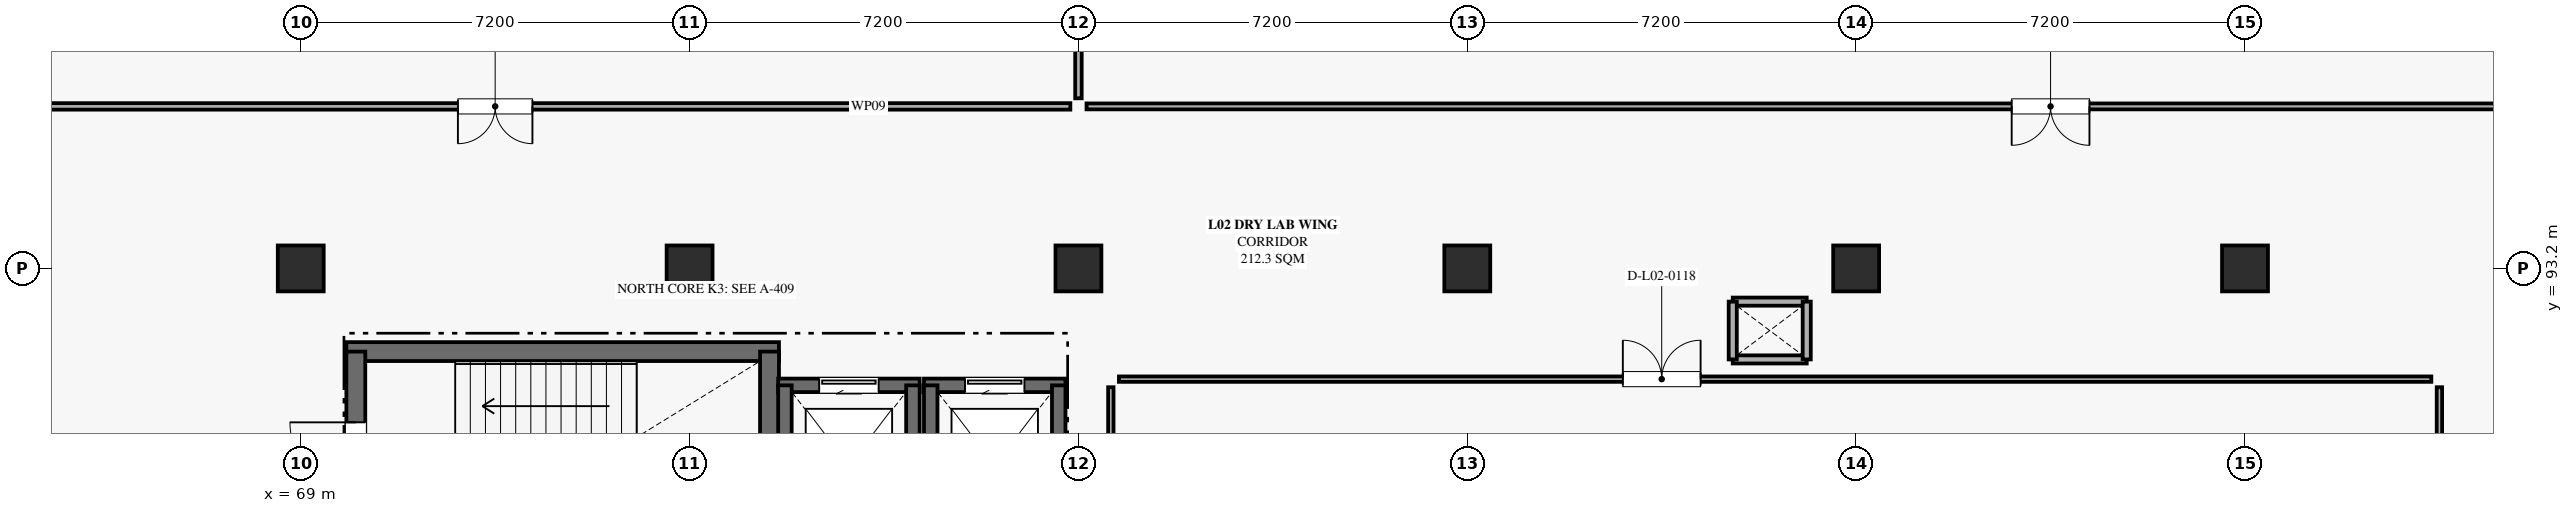
"""IFC4 building model, lengths in metres.
Left out: names, types, materials, properties, quantities, classifications, styles, units other than length and angle.
Written with IfcOpenShell. Run it as: python <this file> out.ifc"""

import sys

from ifc_helpers import new_model, si_unit, direction, frame, frame_2d, origin, origin_2d, place, context, subcontext, project, spatial, rectangle, extrude, element, fill, save


model = new_model("IFC4")
c1 = context("Model", 3, precision=1e-05, world=origin(), true_north=direction((0.0, 1.0)))
c2 = subcontext(c1, "Body", "Model", "MODEL_VIEW")
j1 = project(units=[si_unit("LENGTHUNIT", "METRE"), si_unit("PLANEANGLEUNIT", "RADIAN")], contexts=[c1])
p1 = place(None, origin())
s1 = spatial("IfcSite", under=j1, at=p1, CompositionType="ELEMENT")
p2 = place(p1, origin())
s2 = spatial("IfcBuilding", under=s1, at=p2, CompositionType="ELEMENT")
p3 = place(p2, frame((0.0, 0.0, 10.44)))
s3 = spatial("IfcBuildingStorey", under=s2, at=p3, CompositionType="ELEMENT", Elevation=10.44)
for number, where, z_axis, x_axis in (
    (1, (69.0, 93.2, 0.0), (0.0, 0.0, 1.0), (1.0, 0.0, 0.0)),
    (2, (76.2, 93.2, 0.0), (0.0, 0.0, 1.0), (1.0, 0.0, 0.0)),
    (3, (83.4, 93.2, 0.0), (0.0, 0.0, 1.0), (1.0, 0.0, 0.0)),
    (4, (90.6, 93.2, 0.0), (0.0, 0.0, 1.0), (1.0, 0.0, 0.0)),
    (5, (97.8, 93.2, 0.0), (0.0, 0.0, 1.0), (1.0, 0.0, 0.0)),
    (6, (105.0, 93.2, 0.0), (0.0, 0.0, 1.0), (1.0, 0.0, 0.0)),
):
    element("IfcColumn", number, at=place(p3, frame(where, z_axis=z_axis, x_axis=x_axis)), inside=s3, PredefinedType="COLUMN", context=c2, shape_type="SweptSolid", body=[
        extrude(rectangle(XDim=0.85, YDim=0.85, at=origin_2d()), origin(), (0.0, 0.0, 1.0), 4.68),
    ])
p4 = place(p3, frame((69.845, 91.66, 0.0), z_axis=(0.0, 0.0, 1.0), x_axis=(1.0, 0.0, 0.0)))
e7 = element("IfcWall", 7, at=p4, inside=s3, PredefinedType="SHEAR", context=c2, shape_type="SweptSolid", body=[
    extrude(rectangle(XDim=8.01, YDim=0.35, at=frame_2d((4.005, 0.0))), origin(), (0.0, 0.0, 1.0), 4.41),
])
p5 = place(p3, frame((70.02, 87.82, 0.0), z_axis=(0.0, 0.0, 1.0), x_axis=(0.0, 1.0, 0.0)))
e8 = element("IfcWall", 8, at=p5, inside=s3, PredefinedType="SHEAR", context=c2, shape_type="SweptSolid", body=[
    extrude(rectangle(XDim=3.84, YDim=0.35, at=frame_2d((1.92, 0.0))), origin(), (0.0, 0.0, 1.0), 4.41),
])
p6 = place(p5, frame((1.31, 0.0, 0.0)))
e9 = element("IfcOpeningElement", 9, at=p6, cuts=e8, PredefinedType="OPENING", context=c2, shape_type="SweptSolid", body=[
    extrude(rectangle(XDim=1.22, YDim=2.18, at=frame_2d((0.61, 1.09))), frame((0.0, 0.185, 0.0), z_axis=(0.0, -1.0, 0.0), x_axis=(1.0, 0.0, 0.0)), (0.0, 0.0, 1.0), 0.37),
])
p7 = place(p3, frame((77.68, 91.66, 0.0), z_axis=(0.0, 0.0, 1.0), x_axis=(0.0, -1.0, 0.0)))
e10 = element("IfcWall", 10, at=p7, inside=s3, PredefinedType="SHEAR", context=c2, shape_type="SweptSolid", body=[
    extrude(rectangle(XDim=3.84, YDim=0.35, at=frame_2d((1.92, 0.0))), origin(), (0.0, 0.0, 1.0), 4.41),
])
for number, where, z_axis, x_axis in (
    (11, (96.885, 91.515, 0.0), (0.0, 0.0, 1.0), (-1.0, 0.0, 0.0)),
    (12, (95.515, 92.585, 0.0), (0.0, 0.0, 1.0), (1.0, 0.0, 0.0)),
):
    element("IfcWall", number, at=place(p3, frame(where, z_axis=z_axis, x_axis=x_axis)), inside=s3, PredefinedType="PARTITIONING", context=c2, shape_type="SweptSolid", body=[
        extrude(rectangle(XDim=1.37, YDim=0.15, at=frame_2d((0.685, 0.0))), origin(), (0.0, 0.0, 1.0), 3.16),
    ])
for number, where, z_axis, x_axis in (
    (13, (95.515, 91.515, 0.0), (0.0, 0.0, 1.0), (0.0, 1.0, 0.0)),
    (14, (96.885, 92.585, 0.0), (0.0, 0.0, 1.0), (0.0, -1.0, 0.0)),
):
    element("IfcWall", number, at=place(p3, frame(where, z_axis=z_axis, x_axis=x_axis)), inside=s3, PredefinedType="PARTITIONING", context=c2, shape_type="SweptSolid", body=[
        extrude(rectangle(XDim=1.07, YDim=0.15, at=frame_2d((0.535, 0.0))), origin(), (0.0, 0.0, 1.0), 3.16),
    ])
p8 = place(p3, frame((77.84, 91.035, 0.0), z_axis=(0.0, 0.0, 1.0), x_axis=(1.0, 0.0, 0.0)))
e15 = element("IfcWall", 15, at=p8, inside=s3, PredefinedType="SHEAR", context=c2, shape_type="SweptSolid", body=[
    extrude(rectangle(XDim=2.62, YDim=0.25, at=frame_2d((1.31, 0.0))), origin(), (0.0, 0.0, 1.0), 4.41),
])
p9 = place(p8, frame((0.76, 0.0, 0.0)))
e16 = element("IfcOpeningElement", 16, at=p9, cuts=e15, PredefinedType="OPENING", context=c2, shape_type="SweptSolid", body=[
    extrude(rectangle(XDim=1.1, YDim=2.2, at=frame_2d((0.55, 1.1))), frame((0.0, 0.135, 0.0), z_axis=(0.0, -1.0, 0.0), x_axis=(1.0, 0.0, 0.0)), (0.0, 0.0, 1.0), 0.27),
])
for number, where, z_axis, x_axis in (
    (17, (77.965, 88.065, 0.0), (0.0, 0.0, 1.0), (0.0, 1.0, 0.0)),
    (18, (80.335, 91.035, 0.0), (0.0, 0.0, 1.0), (0.0, -1.0, 0.0)),
):
    element("IfcWall", number, at=place(p3, frame(where, z_axis=z_axis, x_axis=x_axis)), inside=s3, PredefinedType="SHEAR", context=c2, shape_type="SweptSolid", body=[
        extrude(rectangle(XDim=2.97, YDim=0.25, at=frame_2d((1.485, 0.0))), origin(), (0.0, 0.0, 1.0), 4.41),
    ])
p10 = place(p3, frame((80.54, 91.035, 0.0), z_axis=(0.0, 0.0, 1.0), x_axis=(1.0, 0.0, 0.0)))
e19 = element("IfcWall", 19, at=p10, inside=s3, PredefinedType="SHEAR", context=c2, shape_type="SweptSolid", body=[
    extrude(rectangle(XDim=2.62, YDim=0.25, at=frame_2d((1.31, 0.0))), origin(), (0.0, 0.0, 1.0), 4.41),
])
p11 = place(p10, frame((0.76, 0.0, 0.0)))
e20 = element("IfcOpeningElement", 20, at=p11, cuts=e19, PredefinedType="OPENING", context=c2, shape_type="SweptSolid", body=[
    extrude(rectangle(XDim=1.1, YDim=2.2, at=frame_2d((0.55, 1.1))), frame((0.0, 0.135, 0.0), z_axis=(0.0, -1.0, 0.0), x_axis=(1.0, 0.0, 0.0)), (0.0, 0.0, 1.0), 0.27),
])
for number, where, z_axis, x_axis in (
    (21, (80.665, 88.065, 0.0), (0.0, 0.0, 1.0), (0.0, 1.0, 0.0)),
    (22, (83.035, 91.035, 0.0), (0.0, 0.0, 1.0), (0.0, -1.0, 0.0)),
):
    element("IfcWall", number, at=place(p3, frame(where, z_axis=z_axis, x_axis=x_axis)), inside=s3, PredefinedType="SHEAR", context=c2, shape_type="SweptSolid", body=[
        extrude(rectangle(XDim=2.97, YDim=0.25, at=frame_2d((1.485, 0.0))), origin(), (0.0, 0.0, 1.0), 4.41),
    ])
p12 = place(p3, frame((83.25, 96.2, 0.0), z_axis=(0.0, 0.0, 1.0), x_axis=(-1.0, 0.0, 0.0)))
e23 = element("IfcWall", 23, at=p12, inside=s3, PredefinedType="PARTITIONING", context=c2, shape_type="SweptSolid", body=[
    extrude(rectangle(XDim=21.1, YDim=0.12, at=frame_2d((10.55, 0.0))), origin(), (0.0, 0.0, 1.0), 3.16),
])
p13 = place(p12, frame((9.96, 0.0, 0.0)))
e24 = element("IfcOpeningElement", 24, at=p13, cuts=e23, PredefinedType="OPENING", context=c2, shape_type="SweptSolid", body=[
    extrude(rectangle(XDim=1.38, YDim=2.22, at=frame_2d((0.69, 1.11))), frame((0.0, 0.07, 0.0), z_axis=(0.0, -1.0, 0.0), x_axis=(1.0, 0.0, 0.0)), (0.0, 0.0, 1.0), 0.14),
])
p14 = place(p3, frame((83.4, 114.2, 0.0), z_axis=(0.0, 0.0, 1.0), x_axis=(0.0, -1.0, 0.0)))
e25 = element("IfcWall", 25, at=p14, inside=s3, PredefinedType="PARTITIONING", context=c2, shape_type="SweptSolid", body=[
    extrude(rectangle(XDim=17.85, YDim=0.12, at=frame_2d((8.925, 0.0))), origin(), (0.0, 0.0, 1.0), 3.16),
])
p15 = place(p3, frame((111.85, 96.2, 0.0), z_axis=(0.0, 0.0, 1.0), x_axis=(-1.0, 0.0, 0.0)))
e26 = element("IfcWall", 26, at=p15, inside=s3, PredefinedType="PARTITIONING", context=c2, shape_type="SweptSolid", body=[
    extrude(rectangle(XDim=28.3, YDim=0.11, at=frame_2d((14.15, 0.0))), origin(), (0.0, 0.0, 1.0), 3.16),
])
p16 = place(p15, frame((9.73, 0.0, 0.0)))
e27 = element("IfcOpeningElement", 27, at=p16, cuts=e26, PredefinedType="OPENING", context=c2, shape_type="SweptSolid", body=[
    extrude(rectangle(XDim=1.44, YDim=2.05, at=frame_2d((0.72, 1.025))), frame((0.0, 0.065, 0.0), z_axis=(0.0, -1.0, 0.0), x_axis=(1.0, 0.0, 0.0)), (0.0, 0.0, 1.0), 0.13),
])
p17 = place(p3, frame((84.15, 91.15, 0.0), z_axis=(0.0, 0.0, 1.0), x_axis=(1.0, 0.0, 0.0)))
e28 = element("IfcWall", 28, at=p17, inside=s3, PredefinedType="PARTITIONING", context=c2, shape_type="SweptSolid", body=[
    extrude(rectangle(XDim=24.3, YDim=0.1, at=frame_2d((12.15, 0.0))), origin(), (0.0, 0.0, 1.0), 3.16),
])
p18 = place(p17, frame((9.33, 0.0, 0.0)))
e29 = element("IfcOpeningElement", 29, at=p18, cuts=e28, PredefinedType="OPENING", context=c2, shape_type="SweptSolid", body=[
    extrude(rectangle(XDim=1.44, YDim=2.1, at=frame_2d((0.72, 1.05))), frame((0.0, 0.06, 0.0), z_axis=(0.0, -1.0, 0.0), x_axis=(1.0, 0.0, 0.0)), (0.0, 0.0, 1.0), 0.12),
])
for number, where, z_axis, x_axis in (
    (30, (84.0, 86.35, 0.0), (0.0, 0.0, 1.0), (0.0, 1.0, 0.0)),
    (31, (108.6, 91.0, 0.0), (0.0, 0.0, 1.0), (0.0, -1.0, 0.0)),
):
    element("IfcWall", number, at=place(p3, frame(where, z_axis=z_axis, x_axis=x_axis)), inside=s3, PredefinedType="PARTITIONING", context=c2, shape_type="SweptSolid", body=[
        extrude(rectangle(XDim=4.65, YDim=0.1, at=frame_2d((2.325, 0.0))), origin(), (0.0, 0.0, 1.0), 3.16),
    ])
p19 = place(p6, origin())
e32 = element("IfcDoor", 32, at=p19, inside=s3, OperationType="SINGLE_SWING_RIGHT", PredefinedType="DOOR", context=c2, shape_type="SweptSolid", body=[
    extrude(rectangle(XDim=1.22, YDim=2.18, at=frame_2d((0.61, 1.09))), frame((0.0, 0.025, 0.0), z_axis=(0.0, -1.0, 0.0), x_axis=(1.0, 0.0, 0.0)), (0.0, 0.0, 1.0), 0.05),
])
fill(e9, e32)
p20 = place(p9, origin())
e33 = element("IfcDoor", 33, at=p20, inside=s3, OperationType="SLIDING_TO_LEFT", PredefinedType="DOOR", context=c2, shape_type="SweptSolid", body=[
    extrude(rectangle(XDim=1.1, YDim=2.2, at=frame_2d((0.55, 1.1))), frame((0.0, 0.025, 0.0), z_axis=(0.0, -1.0, 0.0), x_axis=(1.0, 0.0, 0.0)), (0.0, 0.0, 1.0), 0.05),
])
fill(e16, e33)
p21 = place(p11, origin())
e34 = element("IfcDoor", 34, at=p21, inside=s3, OperationType="SLIDING_TO_LEFT", PredefinedType="DOOR", context=c2, shape_type="SweptSolid", body=[
    extrude(rectangle(XDim=1.1, YDim=2.2, at=frame_2d((0.55, 1.1))), frame((0.0, 0.025, 0.0), z_axis=(0.0, -1.0, 0.0), x_axis=(1.0, 0.0, 0.0)), (0.0, 0.0, 1.0), 0.05),
])
fill(e20, e34)
p22 = place(p13, origin())
e35 = element("IfcDoor", 35, at=p22, inside=s3, OperationType="DOUBLE_DOOR_SINGLE_SWING", PredefinedType="DOOR", context=c2, shape_type="SweptSolid", body=[
    extrude(rectangle(XDim=1.38, YDim=2.22, at=frame_2d((0.69, 1.11))), frame((0.0, 0.025, 0.0), z_axis=(0.0, -1.0, 0.0), x_axis=(1.0, 0.0, 0.0)), (0.0, 0.0, 1.0), 0.05),
])
fill(e24, e35)
p23 = place(p16, origin())
e36 = element("IfcDoor", 36, at=p23, inside=s3, OperationType="DOUBLE_DOOR_SINGLE_SWING", PredefinedType="DOOR", context=c2, shape_type="SweptSolid", body=[
    extrude(rectangle(XDim=1.44, YDim=2.05, at=frame_2d((0.72, 1.025))), frame((0.0, 0.025, 0.0), z_axis=(0.0, -1.0, 0.0), x_axis=(1.0, 0.0, 0.0)), (0.0, 0.0, 1.0), 0.05),
])
fill(e27, e36)
p24 = place(p18, origin())
e37 = element("IfcDoor", 37, at=p24, inside=s3, OperationType="DOUBLE_DOOR_SINGLE_SWING", PredefinedType="DOOR", context=c2, shape_type="SweptSolid", body=[
    extrude(rectangle(XDim=1.44, YDim=2.1, at=frame_2d((0.72, 1.05))), frame((0.0, 0.025, 0.0), z_axis=(0.0, -1.0, 0.0), x_axis=(1.0, 0.0, 0.0)), (0.0, 0.0, 1.0), 0.05),
])
fill(e29, e37)
save(model, sys.argv[1])
